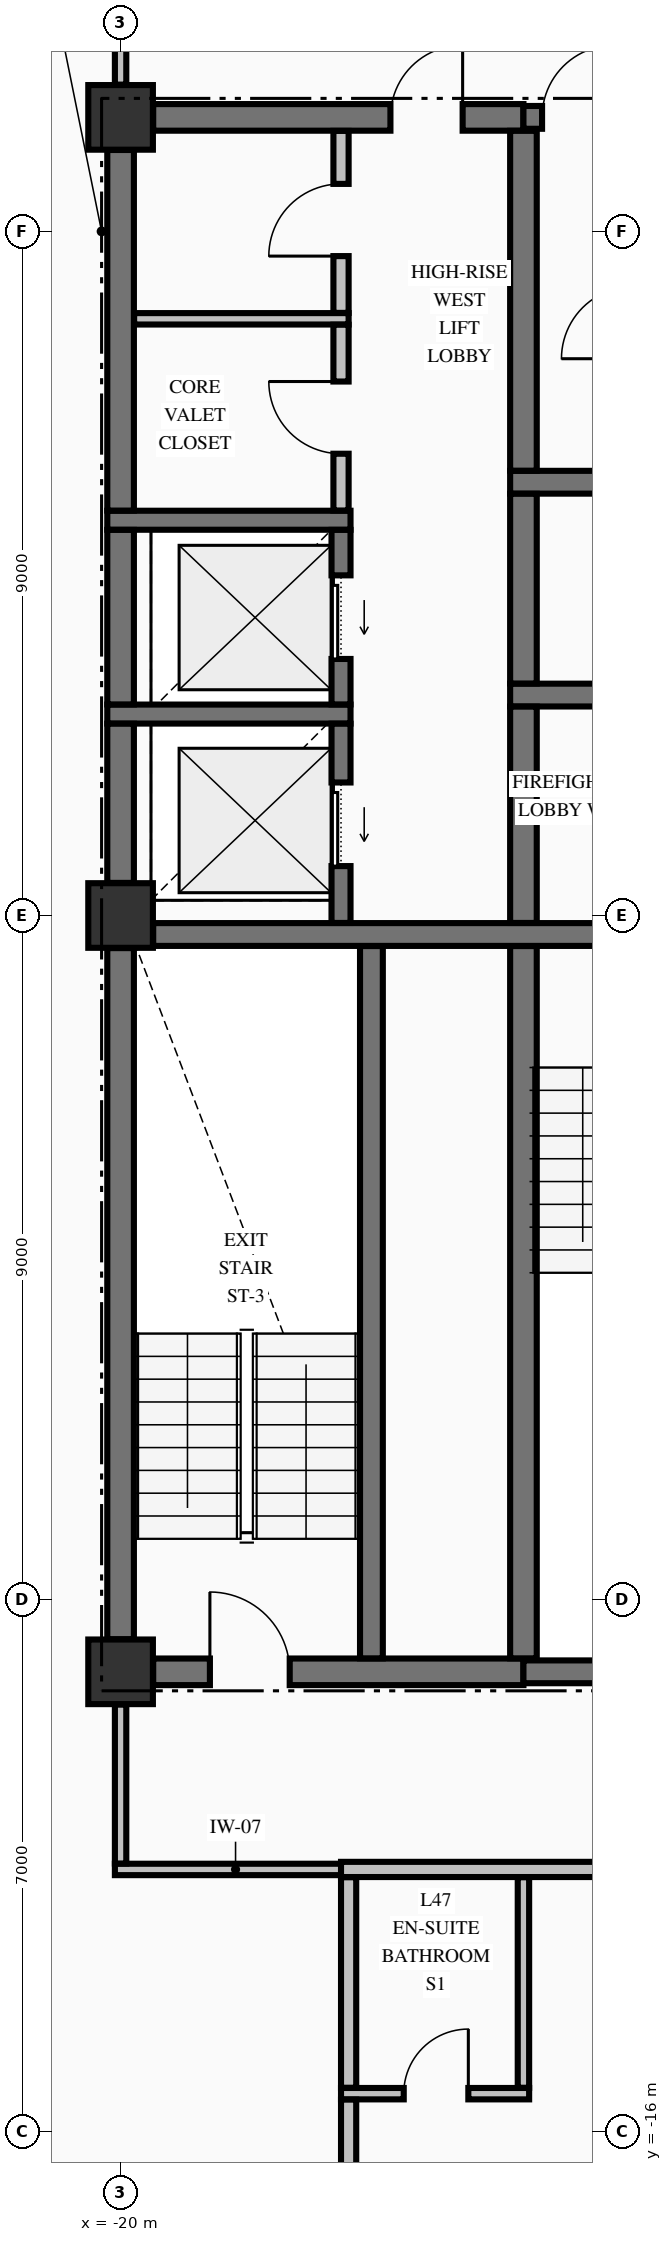
"""IFC4 building model, lengths in metres.
Left out: names, types, materials, properties, quantities, classifications, styles, units other than length and angle.
Written with IfcOpenShell. Run it as: python <this file> out.ifc"""

import sys

from ifc_helpers import new_model, si_unit, direction, frame, frame_2d, origin, origin_2d, place, context, subcontext, project, spatial, rectangle, extrude, element, fill, save


model = new_model("IFC4")
c1 = context("Model", 3, precision=1e-05, world=origin(), true_north=direction((0.0, 1.0)))
c2 = subcontext(c1, "Body", "Model", "MODEL_VIEW")
j1 = project(units=[si_unit("LENGTHUNIT", "METRE"), si_unit("PLANEANGLEUNIT", "RADIAN")], contexts=[c1])
p1 = place(None, origin())
s1 = spatial("IfcSite", under=j1, at=p1, CompositionType="ELEMENT")
p2 = place(p1, origin())
s2 = spatial("IfcBuilding", under=s1, at=p2, CompositionType="ELEMENT")
p3 = place(p2, frame((0.0, 0.0, 183.06)))
s3 = spatial("IfcBuildingStorey", under=s2, at=p3, CompositionType="ELEMENT", Elevation=183.06)
for number, where, z_axis, x_axis in (
    (1, (-20.0, -9.95, -0.25), (0.0, 0.0, 1.0), (1.0, 0.0, 0.0)),
    (2, (-20.0, 10.5, -0.25), (0.0, 0.0, 1.0), (1.0, 0.0, 0.0)),
    (3, (-20.0, 0.0, -0.25), (0.0, 0.0, 1.0), (1.0, 0.0, 0.0)),
):
    element("IfcColumn", number, at=place(p3, frame(where, z_axis=z_axis, x_axis=x_axis)), inside=s3, PredefinedType="COLUMN", context=c2, shape_type="SweptSolid", body=[
        extrude(rectangle(XDim=0.85, YDim=0.85, at=origin_2d()), origin(), (0.0, 0.0, 1.0), 3.225),
    ])
p4 = place(p3, frame((-19.571, -9.95, 0.0), z_axis=(0.0, 0.0, 1.0), x_axis=(1.0, 0.0, 0.0)))
e4 = element("IfcWall", 4, at=p4, inside=s3, PredefinedType="SHEAR", context=c2, shape_type="SweptSolid", body=[
    extrude(rectangle(XDim=4.871, YDim=0.35, at=frame_2d((2.436, 0.0))), origin(), (0.0, 0.0, 1.0), 2.975),
])
p5 = place(p4, frame((0.746, 0.0, 0.0)))
e5 = element("IfcOpeningElement", 5, at=p5, cuts=e4, PredefinedType="OPENING", context=c2, shape_type="SweptSolid", body=[
    extrude(rectangle(XDim=1.05, YDim=2.15, at=frame_2d((0.525, 1.075))), frame((0.0, 0.185, 0.0), z_axis=(0.0, -1.0, 0.0), x_axis=(1.0, 0.0, 0.0)), (0.0, 0.0, 1.0), 0.37),
])
p6 = place(p3, frame((-14.7, -9.95, 0.0), z_axis=(0.0, 0.0, 1.0), x_axis=(1.0, 0.0, 0.0)))
e6 = element("IfcWall", 6, at=p6, inside=s3, PredefinedType="SHEAR", context=c2, shape_type="SweptSolid", body=[
    extrude(rectangle(XDim=3.271, YDim=0.3, at=frame_2d((1.635, 0.0))), origin(), (0.0, 0.0, 1.0), 2.975),
])
p7 = place(p3, frame((-19.571, -0.25, 0.0), z_axis=(0.0, 0.0, 1.0), x_axis=(1.0, 0.0, 0.0)))
e7 = element("IfcWall", 7, at=p7, inside=s3, PredefinedType="SHEAR", context=c2, shape_type="SweptSolid", body=[
    extrude(rectangle(XDim=8.142, YDim=0.3, at=frame_2d((4.071, 0.0))), origin(), (0.0, 0.0, 1.0), 2.975),
])
p8 = place(p7, frame((5.871, 0.0, 0.0)))
e8 = element("IfcOpeningElement", 8, at=p8, cuts=e7, PredefinedType="OPENING", context=c2, shape_type="SweptSolid", body=[
    extrude(rectangle(XDim=1.1, YDim=2.15, at=frame_2d((0.55, 1.075))), frame((0.0, 0.16, 0.0), z_axis=(0.0, -1.0, 0.0), x_axis=(1.0, 0.0, 0.0)), (0.0, 0.0, 1.0), 0.32),
])
p9 = place(p3, frame((-20.175, 2.65, 0.0), z_axis=(0.0, 0.0, 1.0), x_axis=(1.0, 0.0, 0.0)))
e9 = element("IfcWall", 9, at=p9, inside=s3, PredefinedType="SOLIDWALL", context=c2, shape_type="SweptSolid", body=[
    extrude(rectangle(XDim=3.2, YDim=0.25, at=frame_2d((1.6, 0.0))), origin(), (0.0, 0.0, 1.0), 2.975),
])
p10 = place(p3, frame((-14.875, 2.9, 0.0), z_axis=(0.0, 0.0, 1.0), x_axis=(1.0, 0.0, 0.0)))
e10 = element("IfcWall", 10, at=p10, inside=s3, PredefinedType="SHEAR", context=c2, shape_type="SweptSolid", body=[
    extrude(rectangle(XDim=4.025, YDim=0.3, at=frame_2d((2.012, 0.0))), origin(), (0.0, 0.0, 1.0), 2.975),
])
p11 = place(p10, frame((2.075, 0.0, 0.0)))
e11 = element("IfcOpeningElement", 11, at=p11, cuts=e10, PredefinedType="OPENING", context=c2, shape_type="SweptSolid", body=[
    extrude(rectangle(XDim=1.1, YDim=2.2, at=frame_2d((0.55, 1.1))), frame((0.0, 0.16, 0.0), z_axis=(0.0, -1.0, 0.0), x_axis=(1.0, 0.0, 0.0)), (0.0, 0.0, 1.0), 0.32),
])
p12 = place(p3, frame((-20.175, 5.2, 0.0), z_axis=(0.0, 0.0, 1.0), x_axis=(1.0, 0.0, 0.0)))
e12 = element("IfcWall", 12, at=p12, inside=s3, PredefinedType="SOLIDWALL", context=c2, shape_type="SweptSolid", body=[
    extrude(rectangle(XDim=3.2, YDim=0.25, at=frame_2d((1.6, 0.0))), origin(), (0.0, 0.0, 1.0), 2.975),
])
p13 = place(p3, frame((-14.875, 5.7, 0.0), z_axis=(0.0, 0.0, 1.0), x_axis=(1.0, 0.0, 0.0)))
e13 = element("IfcWall", 13, at=p13, inside=s3, PredefinedType="SHEAR", context=c2, shape_type="SweptSolid", body=[
    extrude(rectangle(XDim=4.025, YDim=0.3, at=frame_2d((2.012, 0.0))), origin(), (0.0, 0.0, 1.0), 2.975),
])
p14 = place(p3, frame((-19.571, 10.5, 0.0), z_axis=(0.0, 0.0, 1.0), x_axis=(1.0, 0.0, 0.0)))
e14 = element("IfcWall", 14, at=p14, inside=s3, PredefinedType="SHEAR", context=c2, shape_type="SweptSolid", body=[
    extrude(rectangle(XDim=4.871, YDim=0.35, at=frame_2d((2.436, 0.0))), origin(), (0.0, 0.0, 1.0), 2.975),
])
p15 = place(p14, frame((3.121, 0.0, 0.0)))
e15 = element("IfcOpeningElement", 15, at=p15, cuts=e14, PredefinedType="OPENING", context=c2, shape_type="SweptSolid", body=[
    extrude(rectangle(XDim=0.95, YDim=2.02, at=frame_2d((0.475, 1.01))), frame((0.0, 0.185, 0.0), z_axis=(0.0, -1.0, 0.0), x_axis=(1.0, 0.0, 0.0)), (0.0, 0.0, 1.0), 0.37),
])
p16 = place(p3, frame((-14.7, 10.5, 0.0), z_axis=(0.0, 0.0, 1.0), x_axis=(1.0, 0.0, 0.0)))
e16 = element("IfcWall", 16, at=p16, inside=s3, PredefinedType="SHEAR", context=c2, shape_type="SweptSolid", body=[
    extrude(rectangle(XDim=3.271, YDim=0.3, at=frame_2d((1.635, 0.0))), origin(), (0.0, 0.0, 1.0), 2.975),
])
p17 = place(p16, frame((0.245, 0.0, 0.0)))
e17 = element("IfcOpeningElement", 17, at=p17, cuts=e16, PredefinedType="OPENING", context=c2, shape_type="SweptSolid", body=[
    extrude(rectangle(XDim=0.95, YDim=2.02, at=frame_2d((0.475, 1.01))), frame((0.0, 0.16, 0.0), z_axis=(0.0, -1.0, 0.0), x_axis=(1.0, 0.0, 0.0)), (0.0, 0.0, 1.0), 0.32),
])
p18 = place(p3, frame((-17.1, -15.5, 0.0), z_axis=(0.0, 0.0, 1.0), x_axis=(1.0, 0.0, 0.0)))
e18 = element("IfcWall", 18, at=p18, inside=s3, PredefinedType="PARTITIONING", context=c2, shape_type="SweptSolid", body=[
    extrude(rectangle(XDim=2.475, YDim=0.15, at=frame_2d((1.238, 0.0))), origin(), (0.0, 0.0, 1.0), 2.975),
])
p19 = place(p18, frame((0.825, 0.0, 0.0)))
e19 = element("IfcOpeningElement", 19, at=p19, cuts=e18, PredefinedType="OPENING", context=c2, shape_type="SweptSolid", body=[
    extrude(rectangle(XDim=0.85, YDim=2.1, at=frame_2d((0.425, 1.05))), frame((0.0, 0.085, 0.0), z_axis=(0.0, -1.0, 0.0), x_axis=(1.0, 0.0, 0.0)), (0.0, 0.0, 1.0), 0.17),
])
p20 = place(p3, frame((-20.075, -12.55, 0.0), z_axis=(0.0, 0.0, 1.0), x_axis=(1.0, 0.0, 0.0)))
e20 = element("IfcWall", 20, at=p20, inside=s3, PredefinedType="PARTITIONING", context=c2, shape_type="SweptSolid", body=[
    extrude(rectangle(XDim=3.175, YDim=0.15, at=frame_2d((1.587, 0.0))), origin(), (0.0, 0.0, 1.0), 2.975),
])
p21 = place(p3, frame((-17.1, -12.55, 0.0), z_axis=(0.0, 0.0, 1.0), x_axis=(1.0, 0.0, 0.0)))
e21 = element("IfcWall", 21, at=p21, inside=s3, PredefinedType="PARTITIONING", context=c2, shape_type="SweptSolid", body=[
    extrude(rectangle(XDim=39.2, YDim=0.2, at=frame_2d((19.6, 0.0))), origin(), (0.0, 0.0, 1.0), 2.975),
])
p22 = place(p21, frame((6.475, 0.0, 0.0)))
e22 = element("IfcOpeningElement", 22, at=p22, cuts=e21, PredefinedType="OPENING", context=c2, shape_type="SweptSolid", body=[
    extrude(rectangle(XDim=0.95, YDim=2.15, at=frame_2d((0.475, 1.075))), frame((0.0, 0.11, 0.0), z_axis=(0.0, -1.0, 0.0), x_axis=(1.0, 0.0, 0.0)), (0.0, 0.0, 1.0), 0.22),
])
p23 = place(p21, frame((13.525, 0.0, 0.0)))
e23 = element("IfcOpeningElement", 23, at=p23, cuts=e21, PredefinedType="OPENING", context=c2, shape_type="SweptSolid", body=[
    extrude(rectangle(XDim=0.95, YDim=2.15, at=frame_2d((0.475, 1.075))), frame((0.0, 0.11, 0.0), z_axis=(0.0, -1.0, 0.0), x_axis=(1.0, 0.0, 0.0)), (0.0, 0.0, 1.0), 0.22),
])
p24 = place(p21, frame((23.275, 0.0, 0.0)))
e24 = element("IfcOpeningElement", 24, at=p24, cuts=e21, PredefinedType="OPENING", context=c2, shape_type="SweptSolid", body=[
    extrude(rectangle(XDim=0.95, YDim=2.15, at=frame_2d((0.475, 1.075))), frame((0.0, 0.11, 0.0), z_axis=(0.0, -1.0, 0.0), x_axis=(1.0, 0.0, 0.0)), (0.0, 0.0, 1.0), 0.22),
])
p25 = place(p21, frame((33.175, 0.0, 0.0)))
e25 = element("IfcOpeningElement", 25, at=p25, cuts=e21, PredefinedType="OPENING", context=c2, shape_type="SweptSolid", body=[
    extrude(rectangle(XDim=0.95, YDim=2.15, at=frame_2d((0.475, 1.075))), frame((0.0, 0.11, 0.0), z_axis=(0.0, -1.0, 0.0), x_axis=(1.0, 0.0, 0.0)), (0.0, 0.0, 1.0), 0.22),
])
p26 = place(p3, frame((-19.822, 7.85, 0.0), z_axis=(0.0, 0.0, 1.0), x_axis=(1.0, 0.0, 0.0)))
e26 = element("IfcWall", 26, at=p26, inside=s3, PredefinedType="PARTITIONING", context=c2, shape_type="SweptSolid", body=[
    extrude(rectangle(XDim=2.822, YDim=0.15, at=frame_2d((1.411, 0.0))), origin(), (0.0, 0.0, 1.0), 2.975),
])
p27 = place(p3, frame((-20.0, -9.521, 0.0), z_axis=(0.0, 0.0, 1.0), x_axis=(0.0, 1.0, 0.0)))
e27 = element("IfcWall", 27, at=p27, inside=s3, PredefinedType="SHEAR", context=c2, shape_type="SweptSolid", body=[
    extrude(rectangle(XDim=9.092, YDim=0.35, at=frame_2d((4.546, 0.0))), origin(), (0.0, 0.0, 1.0), 2.975),
])
p28 = place(p3, frame((-20.0, 0.429, 0.0), z_axis=(0.0, 0.0, 1.0), x_axis=(0.0, 1.0, 0.0)))
e28 = element("IfcWall", 28, at=p28, inside=s3, PredefinedType="SHEAR", context=c2, shape_type="SweptSolid", body=[
    extrude(rectangle(XDim=2.094, YDim=0.35, at=frame_2d((1.047, 0.0))), origin(), (0.0, 0.0, 1.0), 2.975),
])
p29 = place(p3, frame((-20.0, 2.777, 0.0), z_axis=(0.0, 0.0, 1.0), x_axis=(0.0, 1.0, 0.0)))
e29 = element("IfcWall", 29, at=p29, inside=s3, PredefinedType="SHEAR", context=c2, shape_type="SweptSolid", body=[
    extrude(rectangle(XDim=2.296, YDim=0.35, at=frame_2d((1.148, 0.0))), origin(), (0.0, 0.0, 1.0), 2.975),
])
p30 = place(p3, frame((-20.0, 5.327, 0.0), z_axis=(0.0, 0.0, 1.0), x_axis=(0.0, 1.0, 0.0)))
e30 = element("IfcWall", 30, at=p30, inside=s3, PredefinedType="SHEAR", context=c2, shape_type="SweptSolid", body=[
    extrude(rectangle(XDim=4.744, YDim=0.35, at=frame_2d((2.372, 0.0))), origin(), (0.0, 0.0, 1.0), 2.975),
])
p31 = place(p3, frame((-17.1, -0.098, 0.0), z_axis=(0.0, 0.0, 1.0), x_axis=(0.0, 1.0, 0.0)))
e31 = element("IfcWall", 31, at=p31, inside=s3, PredefinedType="SOLIDWALL", context=c2, shape_type="SweptSolid", body=[
    extrude(rectangle(XDim=2.621, YDim=0.25, at=frame_2d((1.311, 0.0))), origin(), (0.0, 0.0, 1.0), 2.975),
])
p32 = place(p31, frame((0.748, 0.0, 0.0)))
e32 = element("IfcOpeningElement", 32, at=p32, cuts=e31, PredefinedType="OPENING", context=c2, shape_type="SweptSolid", body=[
    extrude(rectangle(XDim=1.1, YDim=2.2, at=frame_2d((0.55, 1.1))), frame((0.0, 0.135, 0.0), z_axis=(0.0, -1.0, 0.0), x_axis=(1.0, 0.0, 0.0)), (0.0, 0.0, 1.0), 0.27),
])
p33 = place(p3, frame((-17.1, 2.777, 0.0), z_axis=(0.0, 0.0, 1.0), x_axis=(0.0, 1.0, 0.0)))
e33 = element("IfcWall", 33, at=p33, inside=s3, PredefinedType="SOLIDWALL", context=c2, shape_type="SweptSolid", body=[
    extrude(rectangle(XDim=2.296, YDim=0.25, at=frame_2d((1.148, 0.0))), origin(), (0.0, 0.0, 1.0), 2.975),
])
p34 = place(p33, frame((0.598, 0.0, 0.0)))
e34 = element("IfcOpeningElement", 34, at=p34, cuts=e33, PredefinedType="OPENING", context=c2, shape_type="SweptSolid", body=[
    extrude(rectangle(XDim=1.1, YDim=2.2, at=frame_2d((0.55, 1.1))), frame((0.0, 0.135, 0.0), z_axis=(0.0, -1.0, 0.0), x_axis=(1.0, 0.0, 0.0)), (0.0, 0.0, 1.0), 0.27),
])
p35 = place(p3, frame((-16.7, -9.773, 0.0), z_axis=(0.0, 0.0, 1.0), x_axis=(0.0, 1.0, 0.0)))
e35 = element("IfcWall", 35, at=p35, inside=s3, PredefinedType="SHEAR", context=c2, shape_type="SweptSolid", body=[
    extrude(rectangle(XDim=9.371, YDim=0.3, at=frame_2d((4.686, 0.0))), origin(), (0.0, 0.0, 1.0), 2.975),
])
p36 = place(p3, frame((-14.7, -9.773, 0.0), z_axis=(0.0, 0.0, 1.0), x_axis=(0.0, 1.0, 0.0)))
e36 = element("IfcWall", 36, at=p36, inside=s3, PredefinedType="SHEAR", context=c2, shape_type="SweptSolid", body=[
    extrude(rectangle(XDim=9.371, YDim=0.35, at=frame_2d((4.686, 0.0))), origin(), (0.0, 0.0, 1.0), 2.975),
])
p37 = place(p3, frame((-14.7, -0.098, 0.0), z_axis=(0.0, 0.0, 1.0), x_axis=(0.0, 1.0, 0.0)))
e37 = element("IfcWall", 37, at=p37, inside=s3, PredefinedType="SHEAR", context=c2, shape_type="SweptSolid", body=[
    extrude(rectangle(XDim=2.846, YDim=0.35, at=frame_2d((1.423, 0.0))), origin(), (0.0, 0.0, 1.0), 2.975),
])
p38 = place(p3, frame((-14.7, 3.052, 0.0), z_axis=(0.0, 0.0, 1.0), x_axis=(0.0, 1.0, 0.0)))
e38 = element("IfcWall", 38, at=p38, inside=s3, PredefinedType="SHEAR", context=c2, shape_type="SweptSolid", body=[
    extrude(rectangle(XDim=2.496, YDim=0.35, at=frame_2d((1.248, 0.0))), origin(), (0.0, 0.0, 1.0), 2.975),
])
p39 = place(p3, frame((-14.7, 5.852, 0.0), z_axis=(0.0, 0.0, 1.0), x_axis=(0.0, 1.0, 0.0)))
e39 = element("IfcWall", 39, at=p39, inside=s3, PredefinedType="SHEAR", context=c2, shape_type="SweptSolid", body=[
    extrude(rectangle(XDim=4.471, YDim=0.35, at=frame_2d((2.235, 0.0))), origin(), (0.0, 0.0, 1.0), 2.975),
])
p40 = place(p3, frame((-20.0, -12.472, 0.0), z_axis=(0.0, 0.0, 1.0), x_axis=(0.0, 1.0, 0.0)))
e40 = element("IfcWall", 40, at=p40, inside=s3, PredefinedType="PARTITIONING", context=c2, shape_type="SweptSolid", body=[
    extrude(rectangle(XDim=2.091, YDim=0.15, at=frame_2d((1.045, 0.0))), origin(), (0.0, 0.0, 1.0), 2.167),
])
p41 = place(p3, frame((-20.0, 10.931, 0.0), z_axis=(0.0, 0.0, 1.0), x_axis=(0.0, 1.0, 0.0)))
e41 = element("IfcWall", 41, at=p41, inside=s3, PredefinedType="PARTITIONING", context=c2, shape_type="SweptSolid", body=[
    extrude(rectangle(XDim=2.791, YDim=0.15, at=frame_2d((1.396, 0.0))), origin(), (0.0, 0.0, 1.0), 2.167),
])
p42 = place(p3, frame((-17.1, 5.328, 0.0), z_axis=(0.0, 0.0, 1.0), x_axis=(0.0, 1.0, 0.0)))
e42 = element("IfcWall", 42, at=p42, inside=s3, PredefinedType="PARTITIONING", context=c2, shape_type="SweptSolid", body=[
    extrude(rectangle(XDim=2.444, YDim=0.2, at=frame_2d((1.222, 0.0))), origin(), (0.0, 0.0, 1.0), 2.975),
])
p43 = place(p42, frame((0.747, 0.0, 0.0)))
e43 = element("IfcOpeningElement", 43, at=p43, cuts=e42, PredefinedType="OPENING", context=c2, shape_type="SweptSolid", body=[
    extrude(rectangle(XDim=0.95, YDim=2.15, at=frame_2d((0.475, 1.075))), frame((0.0, 0.11, 0.0), z_axis=(0.0, -1.0, 0.0), x_axis=(1.0, 0.0, 0.0)), (0.0, 0.0, 1.0), 0.22),
])
p44 = place(p3, frame((-17.1, 7.928, 0.0), z_axis=(0.0, 0.0, 1.0), x_axis=(0.0, 1.0, 0.0)))
e44 = element("IfcWall", 44, at=p44, inside=s3, PredefinedType="PARTITIONING", context=c2, shape_type="SweptSolid", body=[
    extrude(rectangle(XDim=2.394, YDim=0.2, at=frame_2d((1.197, 0.0))), origin(), (0.0, 0.0, 1.0), 2.975),
])
p45 = place(p44, frame((0.747, 0.0, 0.0)))
e45 = element("IfcOpeningElement", 45, at=p45, cuts=e44, PredefinedType="OPENING", context=c2, shape_type="SweptSolid", body=[
    extrude(rectangle(XDim=0.95, YDim=2.15, at=frame_2d((0.475, 1.075))), frame((0.0, 0.11, 0.0), z_axis=(0.0, -1.0, 0.0), x_axis=(1.0, 0.0, 0.0)), (0.0, 0.0, 1.0), 0.22),
])
p46 = place(p3, frame((-17.0, -18.994, 0.0), z_axis=(0.0, 0.0, 1.0), x_axis=(0.0, 1.0, 0.0)))
e46 = element("IfcWall", 46, at=p46, inside=s3, PredefinedType="PARTITIONING", context=c2, shape_type="SweptSolid", body=[
    extrude(rectangle(XDim=3.416, YDim=0.2, at=frame_2d((1.708, 0.0))), origin(), (0.0, 0.0, 1.0), 2.975),
])
p47 = place(p3, frame((-17.0, -15.422, 0.0), z_axis=(0.0, 0.0, 1.0), x_axis=(0.0, 1.0, 0.0)))
e47 = element("IfcWall", 47, at=p47, inside=s3, PredefinedType="PARTITIONING", context=c2, shape_type="SweptSolid", body=[
    extrude(rectangle(XDim=2.769, YDim=0.2, at=frame_2d((1.385, 0.0))), origin(), (0.0, 0.0, 1.0), 2.975),
])
p48 = place(p3, frame((-14.7, -15.422, 0.0), z_axis=(0.0, 0.0, 1.0), x_axis=(0.0, 1.0, 0.0)))
e48 = element("IfcWall", 48, at=p48, inside=s3, PredefinedType="PARTITIONING", context=c2, shape_type="SweptSolid", body=[
    extrude(rectangle(XDim=2.769, YDim=0.15, at=frame_2d((1.385, 0.0))), origin(), (0.0, 0.0, 1.0), 2.975),
])
p49 = place(p17, origin())
e49 = element("IfcDoor", 49, at=p49, inside=s3, OperationType="SINGLE_SWING_RIGHT", PredefinedType="DOOR", context=c2, shape_type="SweptSolid", body=[
    extrude(rectangle(XDim=0.95, YDim=2.02, at=frame_2d((0.475, 1.01))), frame((0.0, 0.025, 0.0), z_axis=(0.0, -1.0, 0.0), x_axis=(1.0, 0.0, 0.0)), (0.0, 0.0, 1.0), 0.05),
])
fill(e17, e49)
p50 = place(p5, origin())
e50 = element("IfcDoor", 50, at=p50, inside=s3, OperationType="SINGLE_SWING_LEFT", PredefinedType="DOOR", context=c2, shape_type="SweptSolid", body=[
    extrude(rectangle(XDim=1.05, YDim=2.15, at=frame_2d((0.525, 1.075))), frame((0.0, 0.025, 0.0), z_axis=(0.0, -1.0, 0.0), x_axis=(1.0, 0.0, 0.0)), (0.0, 0.0, 1.0), 0.05),
])
fill(e5, e50)
p51 = place(p32, origin())
e51 = element("IfcDoor", 51, at=p51, inside=s3, OperationType="SLIDING_TO_LEFT", PredefinedType="DOOR", context=c2, shape_type="SweptSolid", body=[
    extrude(rectangle(XDim=1.1, YDim=2.2, at=frame_2d((0.55, 1.1))), frame((0.0, 0.025, 0.0), z_axis=(0.0, -1.0, 0.0), x_axis=(1.0, 0.0, 0.0)), (0.0, 0.0, 1.0), 0.05),
])
fill(e32, e51)
p52 = place(p34, origin())
e52 = element("IfcDoor", 52, at=p52, inside=s3, OperationType="SLIDING_TO_LEFT", PredefinedType="DOOR", context=c2, shape_type="SweptSolid", body=[
    extrude(rectangle(XDim=1.1, YDim=2.2, at=frame_2d((0.55, 1.1))), frame((0.0, 0.025, 0.0), z_axis=(0.0, -1.0, 0.0), x_axis=(1.0, 0.0, 0.0)), (0.0, 0.0, 1.0), 0.05),
])
fill(e34, e52)
p53 = place(p15, origin())
e53 = element("IfcDoor", 53, at=p53, inside=s3, OperationType="SINGLE_SWING_RIGHT", PredefinedType="DOOR", context=c2, shape_type="SweptSolid", body=[
    extrude(rectangle(XDim=0.95, YDim=2.02, at=frame_2d((0.475, 1.01))), frame((0.0, 0.025, 0.0), z_axis=(0.0, -1.0, 0.0), x_axis=(1.0, 0.0, 0.0)), (0.0, 0.0, 1.0), 0.05),
])
fill(e15, e53)
p54 = place(p45, origin())
e54 = element("IfcDoor", 54, at=p54, inside=s3, OperationType="SINGLE_SWING_LEFT", PredefinedType="DOOR", context=c2, shape_type="SweptSolid", body=[
    extrude(rectangle(XDim=0.95, YDim=2.15, at=frame_2d((0.475, 1.075))), frame((0.0, 0.025, 0.0), z_axis=(0.0, -1.0, 0.0), x_axis=(1.0, 0.0, 0.0)), (0.0, 0.0, 1.0), 0.05),
])
fill(e45, e54)
p55 = place(p43, origin())
e55 = element("IfcDoor", 55, at=p55, inside=s3, OperationType="SINGLE_SWING_RIGHT", PredefinedType="DOOR", context=c2, shape_type="SweptSolid", body=[
    extrude(rectangle(XDim=0.95, YDim=2.15, at=frame_2d((0.475, 1.075))), frame((0.0, 0.025, 0.0), z_axis=(0.0, -1.0, 0.0), x_axis=(1.0, 0.0, 0.0)), (0.0, 0.0, 1.0), 0.05),
])
fill(e43, e55)
p56 = place(p19, origin())
e56 = element("IfcDoor", 56, at=p56, inside=s3, OperationType="SINGLE_SWING_RIGHT", PredefinedType="DOOR", context=c2, shape_type="SweptSolid", body=[
    extrude(rectangle(XDim=0.85, YDim=2.1, at=frame_2d((0.425, 1.05))), frame((0.0, 0.025, 0.0), z_axis=(0.0, -1.0, 0.0), x_axis=(1.0, 0.0, 0.0)), (0.0, 0.0, 1.0), 0.05),
])
fill(e19, e56)
save(model, sys.argv[1])
